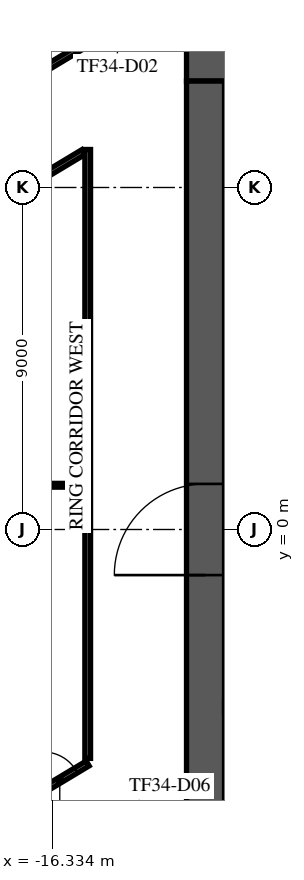
"""IFC4 building model, lengths in metres.
Left out: names, types, materials, properties, quantities, classifications, styles, units other than length and angle.
Written with IfcOpenShell. Run it as: python <this file> out.ifc"""

import sys

from ifc_helpers import new_model, si_unit, direction, frame, frame_2d, origin, place, context, subcontext, project, spatial, rectangle, extrude, element, fill, save


model = new_model("IFC4")
c1 = context("Model", 3, precision=1e-05, world=origin(), true_north=direction((0.0, 1.0)))
c2 = subcontext(c1, "Body", "Model", "MODEL_VIEW")
j1 = project(units=[si_unit("LENGTHUNIT", "METRE"), si_unit("PLANEANGLEUNIT", "RADIAN")], contexts=[c1])
p1 = place(None, origin())
s1 = spatial("IfcSite", under=j1, at=p1, CompositionType="ELEMENT")
p2 = place(p1, origin())
s2 = spatial("IfcBuilding", under=s1, at=p2, CompositionType="ELEMENT")
p3 = place(p2, frame((0.0, 0.0, 147.7)))
s3 = spatial("IfcBuildingStorey", under=s2, at=p3, CompositionType="ELEMENT", Elevation=147.7)
p4 = place(p3, frame((-12.8, 12.3, 0.0), z_axis=(0.0, 0.0, 1.0), x_axis=(1.0, 0.0, 0.0)))
e1 = element("IfcWall", 1, at=p4, inside=s3, PredefinedType="SHEAR", context=c2, shape_type="SweptSolid", body=[
    extrude(rectangle(XDim=25.6, YDim=1.0, at=frame_2d((12.8, 0.0))), origin(), (0.0, 0.0, 1.0), 3.6),
])
p5 = place(p4, frame((11.6, 0.0, 0.0)))
e2 = element("IfcOpeningElement", 2, at=p5, cuts=e1, PredefinedType="OPENING", context=c2, shape_type="SweptSolid", body=[
    extrude(rectangle(XDim=2.4, YDim=2.4, at=frame_2d((1.2, 1.2))), frame((0.0, 0.51, 0.0), z_axis=(0.0, -1.0, 0.0), x_axis=(1.0, 0.0, 0.0)), (0.0, 0.0, 1.0), 1.02),
])
p6 = place(p4, frame((22.425, 0.0, 0.0)))
e3 = element("IfcOpeningElement", 3, at=p6, cuts=e1, PredefinedType="OPENING", context=c2, shape_type="SweptSolid", body=[
    extrude(rectangle(XDim=1.2, YDim=2.1, at=frame_2d((0.6, 1.05))), frame((0.0, 0.51, 0.0), z_axis=(0.0, -1.0, 0.0), x_axis=(1.0, 0.0, 0.0)), (0.0, 0.0, 1.0), 1.02),
])
p7 = place(p4, frame((1.4, 0.0, 0.0)))
e4 = element("IfcOpeningElement", 4, at=p7, cuts=e1, PredefinedType="OPENING", context=c2, shape_type="SweptSolid", body=[
    extrude(rectangle(XDim=1.0, YDim=2.1, at=frame_2d((0.5, 1.05))), frame((0.0, 0.51, 0.0), z_axis=(0.0, -1.0, 0.0), x_axis=(1.0, 0.0, 0.0)), (0.0, 0.0, 1.0), 1.02),
])
p8 = place(p3, frame((-12.3, -11.8, 0.0), z_axis=(0.0, 0.0, 1.0), x_axis=(0.0, 1.0, 0.0)))
e5 = element("IfcWall", 5, at=p8, inside=s3, PredefinedType="SHEAR", context=c2, shape_type="SweptSolid", body=[
    extrude(rectangle(XDim=23.6, YDim=1.0, at=frame_2d((11.8, 0.0))), origin(), (0.0, 0.0, 1.0), 3.6),
])
p9 = place(p8, frame((10.6, 0.0, 0.0)))
e6 = element("IfcOpeningElement", 6, at=p9, cuts=e5, PredefinedType="OPENING", context=c2, shape_type="SweptSolid", body=[
    extrude(rectangle(XDim=2.4, YDim=2.4, at=frame_2d((1.2, 1.2))), frame((0.0, 0.51, 0.0), z_axis=(0.0, -1.0, 0.0), x_axis=(1.0, 0.0, 0.0)), (0.0, 0.0, 1.0), 1.02),
])
p10 = place(p3, frame((-8.65, -4.675, 0.0), z_axis=(0.0, 0.0, 1.0), x_axis=(-1.0, 0.0, 0.0)))
e7 = element("IfcWall", 7, at=p10, inside=s3, PredefinedType="SOLIDWALL", context=c2, shape_type="SweptSolid", body=[
    extrude(rectangle(XDim=3.15, YDim=0.25, at=frame_2d((1.575, 0.0))), origin(), (0.0, 0.0, 1.0), 3.6),
])
p11 = place(p3, frame((7.558, 34.99, 0.0), z_axis=(0.0, 0.0, 1.0), x_axis=(-0.857166849875, -0.515038825212, 0.0)))
e8 = element("IfcWall", 8, at=p11, inside=s3, PredefinedType="STANDARD", context=c2, shape_type="SweptSolid", body=[
    extrude(rectangle(XDim=49.376, YDim=0.6, at=frame_2d((24.688, 0.0))), origin(), (0.0, 0.0, 1.0), 3.6),
])
p12 = place(p11, frame((1.2, 0.0, 0.9)))
e9 = element("IfcOpeningElement", 9, at=p12, cuts=e8, PredefinedType="OPENING", context=c2, shape_type="SweptSolid", body=[
    extrude(rectangle(XDim=2.1, YDim=2.1, at=frame_2d((1.05, 1.05))), frame((0.0, 0.31, 0.0), z_axis=(0.0, -1.0, 0.0), x_axis=(1.0, 0.0, 0.0)), (0.0, 0.0, 1.0), 0.62),
])
p13 = place(p11, frame((5.7, 0.0, 0.9)))
e10 = element("IfcOpeningElement", 10, at=p13, cuts=e8, PredefinedType="OPENING", context=c2, shape_type="SweptSolid", body=[
    extrude(rectangle(XDim=2.1, YDim=2.1, at=frame_2d((1.05, 1.05))), frame((0.0, 0.31, 0.0), z_axis=(0.0, -1.0, 0.0), x_axis=(1.0, 0.0, 0.0)), (0.0, 0.0, 1.0), 0.62),
])
p14 = place(p11, frame((10.2, 0.0, 0.9)))
e11 = element("IfcOpeningElement", 11, at=p14, cuts=e8, PredefinedType="OPENING", context=c2, shape_type="SweptSolid", body=[
    extrude(rectangle(XDim=2.1, YDim=2.1, at=frame_2d((1.05, 1.05))), frame((0.0, 0.31, 0.0), z_axis=(0.0, -1.0, 0.0), x_axis=(1.0, 0.0, 0.0)), (0.0, 0.0, 1.0), 0.62),
])
p15 = place(p11, frame((14.7, 0.0, 0.9)))
e12 = element("IfcOpeningElement", 12, at=p15, cuts=e8, PredefinedType="OPENING", context=c2, shape_type="SweptSolid", body=[
    extrude(rectangle(XDim=2.1, YDim=2.1, at=frame_2d((1.05, 1.05))), frame((0.0, 0.31, 0.0), z_axis=(0.0, -1.0, 0.0), x_axis=(1.0, 0.0, 0.0)), (0.0, 0.0, 1.0), 0.62),
])
p16 = place(p11, frame((19.2, 0.0, 0.9)))
e13 = element("IfcOpeningElement", 13, at=p16, cuts=e8, PredefinedType="OPENING", context=c2, shape_type="SweptSolid", body=[
    extrude(rectangle(XDim=2.1, YDim=2.1, at=frame_2d((1.05, 1.05))), frame((0.0, 0.31, 0.0), z_axis=(0.0, -1.0, 0.0), x_axis=(1.0, 0.0, 0.0)), (0.0, 0.0, 1.0), 0.62),
])
p17 = place(p11, frame((23.7, 0.0, 0.9)))
e14 = element("IfcOpeningElement", 14, at=p17, cuts=e8, PredefinedType="OPENING", context=c2, shape_type="SweptSolid", body=[
    extrude(rectangle(XDim=2.1, YDim=2.1, at=frame_2d((1.05, 1.05))), frame((0.0, 0.31, 0.0), z_axis=(0.0, -1.0, 0.0), x_axis=(1.0, 0.0, 0.0)), (0.0, 0.0, 1.0), 0.62),
])
p18 = place(p11, frame((28.2, 0.0, 0.9)))
e15 = element("IfcOpeningElement", 15, at=p18, cuts=e8, PredefinedType="OPENING", context=c2, shape_type="SweptSolid", body=[
    extrude(rectangle(XDim=2.1, YDim=2.1, at=frame_2d((1.05, 1.05))), frame((0.0, 0.31, 0.0), z_axis=(0.0, -1.0, 0.0), x_axis=(1.0, 0.0, 0.0)), (0.0, 0.0, 1.0), 0.62),
])
p19 = place(p11, frame((32.7, 0.0, 0.9)))
e16 = element("IfcOpeningElement", 16, at=p19, cuts=e8, PredefinedType="OPENING", context=c2, shape_type="SweptSolid", body=[
    extrude(rectangle(XDim=2.1, YDim=2.1, at=frame_2d((1.05, 1.05))), frame((0.0, 0.31, 0.0), z_axis=(0.0, -1.0, 0.0), x_axis=(1.0, 0.0, 0.0)), (0.0, 0.0, 1.0), 0.62),
])
p20 = place(p11, frame((37.2, 0.0, 0.9)))
e17 = element("IfcOpeningElement", 17, at=p20, cuts=e8, PredefinedType="OPENING", context=c2, shape_type="SweptSolid", body=[
    extrude(rectangle(XDim=2.1, YDim=2.1, at=frame_2d((1.05, 1.05))), frame((0.0, 0.31, 0.0), z_axis=(0.0, -1.0, 0.0), x_axis=(1.0, 0.0, 0.0)), (0.0, 0.0, 1.0), 0.62),
])
p21 = place(p11, frame((41.7, 0.0, 0.9)))
e18 = element("IfcOpeningElement", 18, at=p21, cuts=e8, PredefinedType="OPENING", context=c2, shape_type="SweptSolid", body=[
    extrude(rectangle(XDim=2.1, YDim=2.1, at=frame_2d((1.05, 1.05))), frame((0.0, 0.31, 0.0), z_axis=(0.0, -1.0, 0.0), x_axis=(1.0, 0.0, 0.0)), (0.0, 0.0, 1.0), 0.62),
])
p22 = place(p11, frame((46.138, 0.0, 0.9)))
e19 = element("IfcOpeningElement", 19, at=p22, cuts=e8, PredefinedType="OPENING", context=c2, shape_type="SweptSolid", body=[
    extrude(rectangle(XDim=2.1, YDim=2.1, at=frame_2d((1.05, 1.05))), frame((0.0, 0.31, 0.0), z_axis=(0.0, -1.0, 0.0), x_axis=(1.0, 0.0, 0.0)), (0.0, 0.0, 1.0), 0.62),
])
p23 = place(p3, frame((-36.416, 2.94, 0.0), z_axis=(0.0, 0.0, 1.0), x_axis=(0.515041561016, -0.857165206029, 0.0)))
e20 = element("IfcWall", 20, at=p23, inside=s3, PredefinedType="STANDARD", context=c2, shape_type="SweptSolid", body=[
    extrude(rectangle(XDim=42.552, YDim=0.6, at=frame_2d((21.276, 0.0))), origin(), (0.0, 0.0, 1.0), 3.6),
])
p24 = place(p23, frame((1.178, 0.0, 0.9)))
e21 = element("IfcOpeningElement", 21, at=p24, cuts=e20, PredefinedType="OPENING", context=c2, shape_type="SweptSolid", body=[
    extrude(rectangle(XDim=1.8, YDim=2.1, at=frame_2d((0.9, 1.05))), frame((0.0, 0.31, 0.0), z_axis=(0.0, -1.0, 0.0), x_axis=(1.0, 0.0, 0.0)), (0.0, 0.0, 1.0), 0.62),
])
p25 = place(p23, frame((5.396, 0.0, 0.9)))
e22 = element("IfcOpeningElement", 22, at=p25, cuts=e20, PredefinedType="OPENING", context=c2, shape_type="SweptSolid", body=[
    extrude(rectangle(XDim=1.8, YDim=2.1, at=frame_2d((0.9, 1.05))), frame((0.0, 0.31, 0.0), z_axis=(0.0, -1.0, 0.0), x_axis=(1.0, 0.0, 0.0)), (0.0, 0.0, 1.0), 0.62),
])
p26 = place(p23, frame((9.676, 0.0, 0.9)))
e23 = element("IfcOpeningElement", 23, at=p26, cuts=e20, PredefinedType="OPENING", context=c2, shape_type="SweptSolid", body=[
    extrude(rectangle(XDim=1.8, YDim=2.1, at=frame_2d((0.9, 1.05))), frame((0.0, 0.31, 0.0), z_axis=(0.0, -1.0, 0.0), x_axis=(1.0, 0.0, 0.0)), (0.0, 0.0, 1.0), 0.62),
])
p27 = place(p23, frame((13.956, 0.0, 0.9)))
e24 = element("IfcOpeningElement", 24, at=p27, cuts=e20, PredefinedType="OPENING", context=c2, shape_type="SweptSolid", body=[
    extrude(rectangle(XDim=1.8, YDim=2.1, at=frame_2d((0.9, 1.05))), frame((0.0, 0.31, 0.0), z_axis=(0.0, -1.0, 0.0), x_axis=(1.0, 0.0, 0.0)), (0.0, 0.0, 1.0), 0.62),
])
p28 = place(p23, frame((18.236, 0.0, 0.9)))
e25 = element("IfcOpeningElement", 25, at=p28, cuts=e20, PredefinedType="OPENING", context=c2, shape_type="SweptSolid", body=[
    extrude(rectangle(XDim=1.8, YDim=2.1, at=frame_2d((0.9, 1.05))), frame((0.0, 0.31, 0.0), z_axis=(0.0, -1.0, 0.0), x_axis=(1.0, 0.0, 0.0)), (0.0, 0.0, 1.0), 0.62),
])
p29 = place(p23, frame((22.516, 0.0, 0.9)))
e26 = element("IfcOpeningElement", 26, at=p29, cuts=e20, PredefinedType="OPENING", context=c2, shape_type="SweptSolid", body=[
    extrude(rectangle(XDim=1.8, YDim=2.1, at=frame_2d((0.9, 1.05))), frame((0.0, 0.31, 0.0), z_axis=(0.0, -1.0, 0.0), x_axis=(1.0, 0.0, 0.0)), (0.0, 0.0, 1.0), 0.62),
])
p30 = place(p23, frame((26.796, 0.0, 0.9)))
e27 = element("IfcOpeningElement", 27, at=p30, cuts=e20, PredefinedType="OPENING", context=c2, shape_type="SweptSolid", body=[
    extrude(rectangle(XDim=1.8, YDim=2.1, at=frame_2d((0.9, 1.05))), frame((0.0, 0.31, 0.0), z_axis=(0.0, -1.0, 0.0), x_axis=(1.0, 0.0, 0.0)), (0.0, 0.0, 1.0), 0.62),
])
p31 = place(p23, frame((31.076, 0.0, 0.9)))
e28 = element("IfcOpeningElement", 28, at=p31, cuts=e20, PredefinedType="OPENING", context=c2, shape_type="SweptSolid", body=[
    extrude(rectangle(XDim=1.8, YDim=2.1, at=frame_2d((0.9, 1.05))), frame((0.0, 0.31, 0.0), z_axis=(0.0, -1.0, 0.0), x_axis=(1.0, 0.0, 0.0)), (0.0, 0.0, 1.0), 0.62),
])
p32 = place(p23, frame((35.356, 0.0, 0.9)))
e29 = element("IfcOpeningElement", 29, at=p32, cuts=e20, PredefinedType="OPENING", context=c2, shape_type="SweptSolid", body=[
    extrude(rectangle(XDim=1.8, YDim=2.1, at=frame_2d((0.9, 1.05))), frame((0.0, 0.31, 0.0), z_axis=(0.0, -1.0, 0.0), x_axis=(1.0, 0.0, 0.0)), (0.0, 0.0, 1.0), 0.62),
])
p33 = place(p23, frame((39.573, 0.0, 0.9)))
e30 = element("IfcOpeningElement", 30, at=p33, cuts=e20, PredefinedType="OPENING", context=c2, shape_type="SweptSolid", body=[
    extrude(rectangle(XDim=1.8, YDim=2.1, at=frame_2d((0.9, 1.05))), frame((0.0, 0.31, 0.0), z_axis=(0.0, -1.0, 0.0), x_axis=(1.0, 0.0, 0.0)), (0.0, 0.0, 1.0), 0.62),
])
p34 = place(p3, frame((-26.388, 0.711, 0.0), z_axis=(0.0, 0.0, 1.0), x_axis=(0.515060503771, -0.857153823684, 0.0)))
e31 = element("IfcWall", 31, at=p34, inside=s3, PredefinedType="PARTITIONING", context=c2, shape_type="SweptSolid", body=[
    extrude(rectangle(XDim=28.475, YDim=0.15, at=frame_2d((14.238, 0.0))), origin(), (0.0, 0.0, 1.0), 3.15),
])
p35 = place(p34, frame((9.447, 0.0, 0.0)))
e32 = element("IfcOpeningElement", 32, at=p35, cuts=e31, PredefinedType="OPENING", context=c2, shape_type="SweptSolid", body=[
    extrude(rectangle(XDim=1.0, YDim=2.1, at=frame_2d((0.5, 1.05))), frame((0.0, 0.085, 0.0), z_axis=(0.0, -1.0, 0.0), x_axis=(1.0, 0.0, 0.0)), (0.0, 0.0, 1.0), 0.17),
])
p36 = place(p34, frame((17.021, 0.0, 0.0)))
e33 = element("IfcOpeningElement", 33, at=p36, cuts=e31, PredefinedType="OPENING", context=c2, shape_type="SweptSolid", body=[
    extrude(rectangle(XDim=1.0, YDim=2.1, at=frame_2d((0.5, 1.05))), frame((0.0, 0.085, 0.0), z_axis=(0.0, -1.0, 0.0), x_axis=(1.0, 0.0, 0.0)), (0.0, 0.0, 1.0), 0.17),
])
p37 = place(p3, frame((-23.876, 7.707, 0.0), z_axis=(0.0, 0.0, 1.0), x_axis=(0.857167605318, 0.515037567943, 0.0)))
e34 = element("IfcWall", 34, at=p37, inside=s3, PredefinedType="PARTITIONING", context=c2, shape_type="SweptSolid", body=[
    extrude(rectangle(XDim=32.994, YDim=0.15, at=frame_2d((16.497, 0.0))), origin(), (0.0, 0.0, 1.0), 3.15),
])
p38 = place(p37, frame((1.8, 0.0, 0.0)))
e35 = element("IfcOpeningElement", 35, at=p38, cuts=e34, PredefinedType="OPENING", context=c2, shape_type="SweptSolid", body=[
    extrude(rectangle(XDim=1.8, YDim=2.1, at=frame_2d((0.9, 1.05))), frame((0.0, 0.085, 0.0), z_axis=(0.0, -1.0, 0.0), x_axis=(1.0, 0.0, 0.0)), (0.0, 0.0, 1.0), 0.17),
])
p39 = place(p37, frame((10.3, 0.0, 0.0)))
e36 = element("IfcOpeningElement", 36, at=p39, cuts=e34, PredefinedType="OPENING", context=c2, shape_type="SweptSolid", body=[
    extrude(rectangle(XDim=1.0, YDim=2.1, at=frame_2d((0.5, 1.05))), frame((0.0, 0.085, 0.0), z_axis=(0.0, -1.0, 0.0), x_axis=(1.0, 0.0, 0.0)), (0.0, 0.0, 1.0), 0.17),
])
p40 = place(p37, frame((14.059, 0.0, 0.0)))
e37 = element("IfcOpeningElement", 37, at=p40, cuts=e34, PredefinedType="OPENING", context=c2, shape_type="SweptSolid", body=[
    extrude(rectangle(XDim=1.0, YDim=2.1, at=frame_2d((0.5, 1.05))), frame((0.0, 0.085, 0.0), z_axis=(0.0, -1.0, 0.0), x_axis=(1.0, 0.0, 0.0)), (0.0, 0.0, 1.0), 0.17),
])
p41 = place(p37, frame((20.458, 0.0, 0.0)))
e38 = element("IfcOpeningElement", 38, at=p41, cuts=e34, PredefinedType="OPENING", context=c2, shape_type="SweptSolid", body=[
    extrude(rectangle(XDim=1.0, YDim=2.1, at=frame_2d((0.5, 1.05))), frame((0.0, 0.085, 0.0), z_axis=(0.0, -1.0, 0.0), x_axis=(1.0, 0.0, 0.0)), (0.0, 0.0, 1.0), 0.17),
])
p42 = place(p3, frame((-22.576, 5.688, 0.0), z_axis=(0.0, 0.0, 1.0), x_axis=(0.857121436901, 0.515114397396, 0.0)))
e39 = element("IfcWall", 39, at=p42, inside=s3, PredefinedType="PARTITIONING", context=c2, shape_type="SweptSolid", body=[
    extrude(rectangle(XDim=8.239, YDim=0.15, at=frame_2d((4.12, 0.0))), origin(), (0.0, 0.0, 1.0), 3.15),
])
p43 = place(p3, frame((-18.321, -7.911, 0.0), z_axis=(0.0, 0.0, 1.0), x_axis=(0.857126069009, 0.51510668975, 0.0)))
e40 = element("IfcWall", 40, at=p43, inside=s3, PredefinedType="PARTITIONING", context=c2, shape_type="SweptSolid", body=[
    extrude(rectangle(XDim=3.408, YDim=0.15, at=frame_2d((1.704, 0.0))), origin(), (0.0, 0.0, 1.0), 3.6),
])
p44 = place(p43, frame((2.05, 0.0, 0.0)))
e41 = element("IfcOpeningElement", 41, at=p44, cuts=e40, PredefinedType="OPENING", context=c2, shape_type="SweptSolid", body=[
    extrude(rectangle(XDim=1.0, YDim=2.1, at=frame_2d((0.5, 1.05))), frame((0.0, 0.085, 0.0), z_axis=(0.0, -1.0, 0.0), x_axis=(1.0, 0.0, 0.0)), (0.0, 0.0, 1.0), 0.17),
])
p45 = place(p3, frame((-15.4, -6.023, 0.0), z_axis=(0.0, 0.0, 1.0), x_axis=(0.0, 1.0, 0.0)))
e42 = element("IfcWall", 42, at=p45, inside=s3, PredefinedType="PARTITIONING", context=c2, shape_type="SweptSolid", body=[
    extrude(rectangle(XDim=16.023, YDim=0.15, at=frame_2d((8.012, 0.0))), origin(), (0.0, 0.0, 1.0), 3.15),
])
p46 = place(p3, frame((-23.743, 1.164, 0.0), z_axis=(0.0, 0.0, 1.0), x_axis=(1.0, 0.0, 0.0)))
e43 = element("IfcWall", 43, at=p46, inside=s3, PredefinedType="PARTITIONING", context=c2, shape_type="SweptSolid", body=[
    extrude(rectangle(XDim=8.268, YDim=0.1, at=frame_2d((4.134, 0.0))), origin(), (0.0, 0.0, 1.0), 3.6),
])
p47 = place(p9, origin())
e44 = element("IfcDoor", 44, at=p47, inside=s3, OperationType="SINGLE_SWING_LEFT", PredefinedType="DOOR", context=c2, shape_type="SweptSolid", body=[
    extrude(rectangle(XDim=2.4, YDim=2.4, at=frame_2d((1.2, 1.2))), frame((0.0, 0.025, 0.0), z_axis=(0.0, -1.0, 0.0), x_axis=(1.0, 0.0, 0.0)), (0.0, 0.0, 1.0), 0.05),
])
fill(e6, e44)
p48 = place(p44, origin())
e45 = element("IfcDoor", 45, at=p48, inside=s3, OperationType="SINGLE_SWING_LEFT", PredefinedType="DOOR", context=c2, shape_type="SweptSolid", body=[
    extrude(rectangle(XDim=1.0, YDim=2.1, at=frame_2d((0.5, 1.05))), frame((0.0, 0.025, 0.0), z_axis=(0.0, -1.0, 0.0), x_axis=(1.0, 0.0, 0.0)), (0.0, 0.0, 1.0), 0.05),
])
fill(e41, e45)
save(model, sys.argv[1])
